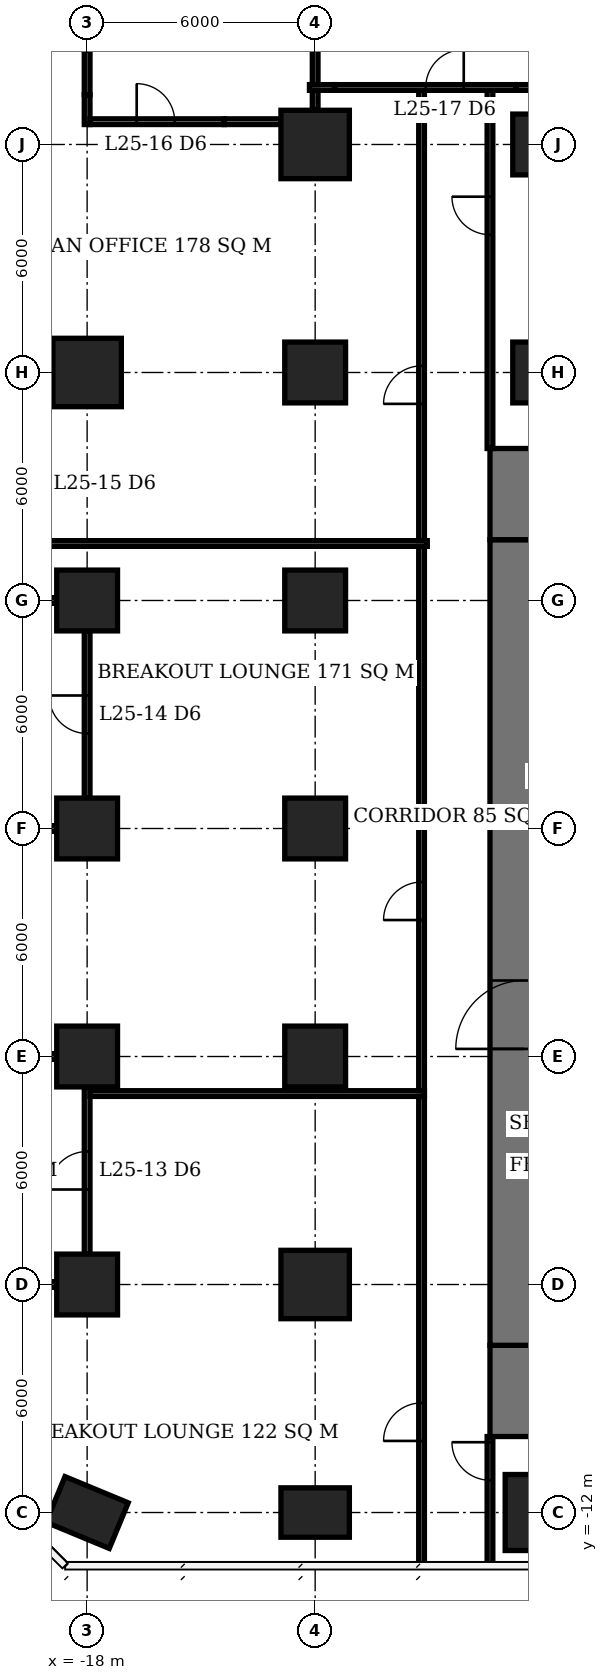
"""IFC4 building model, lengths in metres.
Left out: names, types, materials, properties, quantities, classifications, styles, units other than length and angle.
Written with IfcOpenShell. Run it as: python <this file> out.ifc"""

import sys

from ifc_helpers import new_model, si_unit, direction, frame, frame_2d, origin, origin_2d, place, context, subcontext, project, spatial, rectangle, extrude, element, fill, save


model = new_model("IFC4")
c1 = context("Model", 3, precision=1e-05, world=origin(), true_north=direction((0.0, 1.0)))
c2 = subcontext(c1, "Body", "Model", "MODEL_VIEW")
j1 = project(units=[si_unit("LENGTHUNIT", "METRE"), si_unit("PLANEANGLEUNIT", "RADIAN")], contexts=[c1])
p1 = place(None, origin())
s1 = spatial("IfcSite", under=j1, at=p1, CompositionType="ELEMENT")
p2 = place(p1, origin())
s2 = spatial("IfcBuilding", under=s1, at=p2, CompositionType="ELEMENT")
p3 = place(p2, frame((0.0, 0.0, 105.5)))
s3 = spatial("IfcBuildingStorey", under=s2, at=p3, CompositionType="ELEMENT", Elevation=105.5)
p4 = place(p3, frame((-18.0, -12.0, 0.0), z_axis=(0.0, 0.0, 1.0), x_axis=(-0.923879532511, 0.382683432365, 0.0)))
e1 = element("IfcColumn", 1, at=p4, inside=s3, PredefinedType="COLUMN", context=c2, shape_type="SweptSolid", body=[
    extrude(rectangle(XDim=1.8, YDim=1.3, at=origin_2d()), origin(), (0.0, 0.0, 1.0), 3.9),
])
for number, where, z_axis, x_axis in (
    (2, (-18.0, -6.0, 0.0), (0.0, 0.0, 1.0), (1.0, 0.0, 0.0)),
    (3, (-18.0, 0.0, 0.0), (0.0, 0.0, 1.0), (1.0, 0.0, 0.0)),
    (4, (-18.0, 6.0, 0.0), (0.0, 0.0, 1.0), (1.0, 0.0, 0.0)),
    (5, (-18.0, 12.0, 0.0), (0.0, 0.0, 1.0), (1.0, 0.0, 0.0)),
):
    element("IfcColumn", number, at=place(p3, frame(where, z_axis=z_axis, x_axis=x_axis)), inside=s3, PredefinedType="COLUMN", context=c2, shape_type="SweptSolid", body=[
        extrude(rectangle(XDim=1.6, YDim=1.6, at=origin_2d()), origin(), (0.0, 0.0, 1.0), 3.9),
    ])
p5 = place(p3, frame((-18.0, 18.0, 0.0), z_axis=(0.0, 0.0, 1.0), x_axis=(1.0, 0.0, 0.0)))
e6 = element("IfcColumn", 6, at=p5, inside=s3, PredefinedType="COLUMN", context=c2, shape_type="SweptSolid", body=[
    extrude(rectangle(XDim=1.8, YDim=1.8, at=origin_2d()), origin(), (0.0, 0.0, 1.0), 3.9),
])
p6 = place(p3, frame((-12.0, -12.0, 0.0), z_axis=(0.0, 0.0, 1.0), x_axis=(1.0, 0.0, 0.0)))
e7 = element("IfcColumn", 7, at=p6, inside=s3, PredefinedType="COLUMN", context=c2, shape_type="SweptSolid", body=[
    extrude(rectangle(XDim=1.8, YDim=1.3, at=origin_2d()), origin(), (0.0, 0.0, 1.0), 3.9),
])
p7 = place(p3, frame((-12.0, -6.0, 0.0), z_axis=(0.0, 0.0, 1.0), x_axis=(1.0, 0.0, 0.0)))
e8 = element("IfcColumn", 8, at=p7, inside=s3, PredefinedType="COLUMN", context=c2, shape_type="SweptSolid", body=[
    extrude(rectangle(XDim=1.8, YDim=1.8, at=origin_2d()), origin(), (0.0, 0.0, 1.0), 3.9),
])
for number, where, z_axis, x_axis in (
    (9, (-12.0, 0.0, 0.0), (0.0, 0.0, 1.0), (1.0, 0.0, 0.0)),
    (10, (-12.0, 6.0, 0.0), (0.0, 0.0, 1.0), (1.0, 0.0, 0.0)),
    (11, (-12.0, 12.0, 0.0), (0.0, 0.0, 1.0), (1.0, 0.0, 0.0)),
    (12, (-12.0, 18.0, 0.0), (0.0, 0.0, 1.0), (1.0, 0.0, 0.0)),
):
    element("IfcColumn", number, at=place(p3, frame(where, z_axis=z_axis, x_axis=x_axis)), inside=s3, PredefinedType="COLUMN", context=c2, shape_type="SweptSolid", body=[
        extrude(rectangle(XDim=1.6, YDim=1.6, at=origin_2d()), origin(), (0.0, 0.0, 1.0), 3.9),
    ])
p8 = place(p3, frame((-12.0, 24.0, 0.0), z_axis=(0.0, 0.0, 1.0), x_axis=(1.0, 0.0, 0.0)))
e13 = element("IfcColumn", 13, at=p8, inside=s3, PredefinedType="COLUMN", context=c2, shape_type="SweptSolid", body=[
    extrude(rectangle(XDim=1.8, YDim=1.8, at=origin_2d()), origin(), (0.0, 0.0, 1.0), 3.9),
])
p9 = place(p3, frame((-6.0, -12.0, 0.0), z_axis=(0.0, 0.0, 1.0), x_axis=(1.0, 0.0, 0.0)))
e14 = element("IfcColumn", 14, at=p9, inside=s3, PredefinedType="COLUMN", context=c2, shape_type="SweptSolid", body=[
    extrude(rectangle(XDim=2.0, YDim=2.0, at=origin_2d()), origin(), (0.0, 0.0, 1.0), 3.9),
])
for number, where, z_axis, x_axis in (
    (15, (-6.0, 18.0, 0.0), (0.0, 0.0, 1.0), (1.0, 0.0, 0.0)),
    (16, (-6.0, 24.0, 0.0), (0.0, 0.0, 1.0), (1.0, 0.0, 0.0)),
):
    element("IfcColumn", number, at=place(p3, frame(where, z_axis=z_axis, x_axis=x_axis)), inside=s3, PredefinedType="COLUMN", context=c2, shape_type="SweptSolid", body=[
        extrude(rectangle(XDim=1.6, YDim=1.6, at=origin_2d()), origin(), (0.0, 0.0, 1.0), 3.9),
    ])
p10 = place(p3, frame((-6.5, -7.6, 0.0), z_axis=(0.0, 0.0, 1.0), x_axis=(0.0, 1.0, 0.0)))
e17 = element("IfcWall", 17, at=p10, inside=s3, PredefinedType="SHEAR", context=c2, shape_type="SweptSolid", body=[
    extrude(rectangle(XDim=21.2, YDim=1.8, at=frame_2d((10.6, 0.0))), origin(), (0.0, 0.0, 1.0), 3.9),
])
p11 = place(p10, frame((7.8, 0.0, 0.0)))
e18 = element("IfcOpeningElement", 18, at=p11, cuts=e17, PredefinedType="OPENING", context=c2, shape_type="SweptSolid", body=[
    extrude(rectangle(XDim=1.8, YDim=2.4, at=frame_2d((0.9, 1.2))), frame((0.0, 0.91, 0.0), z_axis=(0.0, -1.0, 0.0), x_axis=(1.0, 0.0, 0.0)), (0.0, 0.0, 1.0), 1.82),
])
for number, where, z_axis, x_axis in (
    (19, (-6.5, -10.0, 0.0), (0.0, 0.0, 1.0), (0.0, 1.0, 0.0)),
    (20, (-6.5, 13.6, 0.0), (0.0, 0.0, 1.0), (0.0, 1.0, 0.0)),
):
    element("IfcWall", number, at=place(p3, frame(where, z_axis=z_axis, x_axis=x_axis)), inside=s3, PredefinedType="SHEAR", context=c2, shape_type="SweptSolid", body=[
        extrude(rectangle(XDim=2.4, YDim=1.8, at=frame_2d((1.2, 0.0))), origin(), (0.0, 0.0, 1.0), 3.9),
    ])
for number, where, z_axis, x_axis in (
    (21, (-22.31, -6.0, 0.0), (0.0, 0.0, 1.0), (1.0, 0.0, 0.0)),
    (22, (-22.31, 0.0, 0.0), (0.0, 0.0, 1.0), (1.0, 0.0, 0.0)),
    (23, (-22.31, 6.0, 0.0), (0.0, 0.0, 1.0), (1.0, 0.0, 0.0)),
):
    element("IfcWall", number, at=place(p3, frame(where, z_axis=z_axis, x_axis=x_axis)), inside=s3, PredefinedType="PARTITIONING", context=c2, shape_type="SweptSolid", body=[
        extrude(rectangle(XDim=3.51, YDim=0.15, at=frame_2d((1.755, 0.0))), origin(), (0.0, 0.0, 1.0), 2.65),
    ])
p12 = place(p3, frame((-19.2, 12.0, 0.0), z_axis=(0.0, 0.0, 1.0), x_axis=(1.0, 0.0, 0.0)))
e24 = element("IfcWall", 24, at=p12, inside=s3, PredefinedType="PARTITIONING", context=c2, shape_type="SweptSolid", body=[
    extrude(rectangle(XDim=0.4, YDim=0.15, at=frame_2d((0.2, 0.0))), origin(), (0.0, 0.0, 1.0), 2.65),
])
p13 = place(p3, frame((-17.925, 24.6, 0.0), z_axis=(0.0, 0.0, 1.0), x_axis=(1.0, 0.0, 0.0)))
e25 = element("IfcWall", 25, at=p13, inside=s3, PredefinedType="PARTITIONING", context=c2, shape_type="SweptSolid", body=[
    extrude(rectangle(XDim=3.533, YDim=0.15, at=frame_2d((1.767, 0.0))), origin(), (0.0, 0.0, 1.0), 3.65),
])
p14 = place(p13, frame((1.229, 0.0, 0.0)))
e26 = element("IfcOpeningElement", 26, at=p14, cuts=e25, PredefinedType="OPENING", context=c2, shape_type="SweptSolid", body=[
    extrude(rectangle(XDim=1.0, YDim=2.1, at=frame_2d((0.5, 1.05))), frame((0.0, 0.085, 0.0), z_axis=(0.0, -1.0, 0.0), x_axis=(1.0, 0.0, 0.0)), (0.0, 0.0, 1.0), 0.17),
])
p15 = place(p3, frame((-14.392, 24.6, 0.0), z_axis=(0.0, 0.0, 1.0), x_axis=(1.0, 0.0, 0.0)))
e27 = element("IfcWall", 27, at=p15, inside=s3, PredefinedType="PARTITIONING", context=c2, shape_type="SweptSolid", body=[
    extrude(rectangle(XDim=1.492, YDim=0.15, at=frame_2d((0.746, 0.0))), origin(), (0.0, 0.0, 1.0), 2.65),
])
p16 = place(p3, frame((-12.15, 25.5, 0.0), z_axis=(0.0, 0.0, 1.0), x_axis=(1.0, 0.0, 0.0)))
e28 = element("IfcWall", 28, at=p16, inside=s3, PredefinedType="PARTITIONING", context=c2, shape_type="SweptSolid", body=[
    extrude(rectangle(XDim=0.66, YDim=0.15, at=frame_2d((0.33, 0.0))), origin(), (0.0, 0.0, 1.0), 2.65),
])
p17 = place(p3, frame((-11.49, 25.5, 0.0), z_axis=(0.0, 0.0, 1.0), x_axis=(1.0, 0.0, 0.0)))
e29 = element("IfcWall", 29, at=p17, inside=s3, PredefinedType="PARTITIONING", context=c2, shape_type="SweptSolid", body=[
    extrude(rectangle(XDim=4.78, YDim=0.15, at=frame_2d((2.39, 0.0))), origin(), (0.0, 0.0, 1.0), 3.65),
])
p18 = place(p17, frame((2.4, 0.0, 0.0)))
e30 = element("IfcOpeningElement", 30, at=p18, cuts=e29, PredefinedType="OPENING", context=c2, shape_type="SweptSolid", body=[
    extrude(rectangle(XDim=1.0, YDim=2.1, at=frame_2d((0.5, 1.05))), frame((0.0, 0.085, 0.0), z_axis=(0.0, -1.0, 0.0), x_axis=(1.0, 0.0, 0.0)), (0.0, 0.0, 1.0), 0.17),
])
p19 = place(p3, frame((-6.71, 25.5, 0.0), z_axis=(0.0, 0.0, 1.0), x_axis=(1.0, 0.0, 0.0)))
e31 = element("IfcWall", 31, at=p19, inside=s3, PredefinedType="PARTITIONING", context=c2, shape_type="SweptSolid", body=[
    extrude(rectangle(XDim=0.785, YDim=0.15, at=frame_2d((0.393, 0.0))), origin(), (0.0, 0.0, 1.0), 2.65),
])
p20 = place(p3, frame((-18.0, -5.2, 0.0), z_axis=(0.0, 0.0, 1.0), x_axis=(0.0, 1.0, 0.0)))
e32 = element("IfcWall", 32, at=p20, inside=s3, PredefinedType="PARTITIONING", context=c2, shape_type="SweptSolid", body=[
    extrude(rectangle(XDim=4.4, YDim=0.15, at=frame_2d((2.2, 0.0))), origin(), (0.0, 0.0, 1.0), 3.65),
])
p21 = place(p20, frame((1.7, 0.0, 0.0)))
e33 = element("IfcOpeningElement", 33, at=p21, cuts=e32, PredefinedType="OPENING", context=c2, shape_type="SweptSolid", body=[
    extrude(rectangle(XDim=1.0, YDim=2.1, at=frame_2d((0.5, 1.05))), frame((0.0, 0.085, 0.0), z_axis=(0.0, -1.0, 0.0), x_axis=(1.0, 0.0, 0.0)), (0.0, 0.0, 1.0), 0.17),
])
p22 = place(p3, frame((-18.0, 6.8, 0.0), z_axis=(0.0, 0.0, 1.0), x_axis=(0.0, 1.0, 0.0)))
e34 = element("IfcWall", 34, at=p22, inside=s3, PredefinedType="PARTITIONING", context=c2, shape_type="SweptSolid", body=[
    extrude(rectangle(XDim=4.4, YDim=0.15, at=frame_2d((2.2, 0.0))), origin(), (0.0, 0.0, 1.0), 3.65),
])
p23 = place(p22, frame((1.7, 0.0, 0.0)))
e35 = element("IfcOpeningElement", 35, at=p23, cuts=e34, PredefinedType="OPENING", context=c2, shape_type="SweptSolid", body=[
    extrude(rectangle(XDim=1.0, YDim=2.1, at=frame_2d((0.5, 1.05))), frame((0.0, 0.085, 0.0), z_axis=(0.0, -1.0, 0.0), x_axis=(1.0, 0.0, 0.0)), (0.0, 0.0, 1.0), 0.17),
])
p24 = place(p3, frame((-18.0, 24.525, 0.0), z_axis=(0.0, 0.0, 1.0), x_axis=(0.0, 1.0, 0.0)))
e36 = element("IfcWall", 36, at=p24, inside=s3, PredefinedType="PARTITIONING", context=c2, shape_type="SweptSolid", body=[
    extrude(rectangle(XDim=0.785, YDim=0.15, at=frame_2d((0.393, 0.0))), origin(), (0.0, 0.0, 1.0), 3.65),
])
p25 = place(p3, frame((-18.0, 25.31, 0.0), z_axis=(0.0, 0.0, 1.0), x_axis=(0.0, 1.0, 0.0)))
e37 = element("IfcWall", 37, at=p25, inside=s3, PredefinedType="PARTITIONING", context=c2, shape_type="SweptSolid", body=[
    extrude(rectangle(XDim=1.18, YDim=0.15, at=frame_2d((0.59, 0.0))), origin(), (0.0, 0.0, 1.0), 2.65),
])
p26 = place(p3, frame((-12.0, 24.9, 0.0), z_axis=(0.0, 0.0, 1.0), x_axis=(0.0, 1.0, 0.0)))
e38 = element("IfcWall", 38, at=p26, inside=s3, PredefinedType="PARTITIONING", context=c2, shape_type="SweptSolid", body=[
    extrude(rectangle(XDim=0.525, YDim=0.15, at=frame_2d((0.263, 0.0))), origin(), (0.0, 0.0, 1.0), 2.65),
])
p27 = place(p3, frame((-12.0, 25.575, 0.0), z_axis=(0.0, 0.0, 1.0), x_axis=(0.0, 1.0, 0.0)))
e39 = element("IfcWall", 39, at=p27, inside=s3, PredefinedType="PARTITIONING", context=c2, shape_type="SweptSolid", body=[
    extrude(rectangle(XDim=2.735, YDim=0.15, at=frame_2d((1.368, 0.0))), origin(), (0.0, 0.0, 1.0), 2.65),
])
p28 = place(p3, frame((-19.125, 13.5, 0.0), z_axis=(0.0, 0.0, 1.0), x_axis=(1.0, 0.0, 0.0)))
e40 = element("IfcWall", 40, at=p28, inside=s3, PredefinedType="PARTITIONING", context=c2, shape_type="SweptSolid", body=[
    extrude(rectangle(XDim=10.075, YDim=0.15, at=frame_2d((5.038, 0.0))), origin(), (0.0, 0.0, 1.0), 3.65),
])
p29 = place(p3, frame((-17.925, -0.975, 0.0), z_axis=(0.0, 0.0, 1.0), x_axis=(1.0, 0.0, 0.0)))
e41 = element("IfcWall", 41, at=p29, inside=s3, PredefinedType="PARTITIONING", context=c2, shape_type="SweptSolid", body=[
    extrude(rectangle(XDim=8.8, YDim=0.15, at=frame_2d((4.4, 0.0))), origin(), (0.0, 0.0, 1.0), 3.65),
])
p30 = place(p3, frame((-9.2, -13.35, 0.0), z_axis=(0.0, 0.0, 1.0), x_axis=(0.0, 1.0, 0.0)))
e42 = element("IfcWall", 42, at=p30, inside=s3, PredefinedType="PARTITIONING", context=c2, shape_type="SweptSolid", body=[
    extrude(rectangle(XDim=12.3, YDim=0.15, at=frame_2d((6.15, 0.0))), origin(), (0.0, 0.0, 1.0), 3.65),
])
p31 = place(p30, frame((3.234, 0.0, 0.0)))
e43 = element("IfcOpeningElement", 43, at=p31, cuts=e42, PredefinedType="OPENING", context=c2, shape_type="SweptSolid", body=[
    extrude(rectangle(XDim=1.0, YDim=2.1, at=frame_2d((0.5, 1.05))), frame((0.0, 0.085, 0.0), z_axis=(0.0, -1.0, 0.0), x_axis=(1.0, 0.0, 0.0)), (0.0, 0.0, 1.0), 0.17),
])
p32 = place(p3, frame((-9.2, -0.9, 0.0), z_axis=(0.0, 0.0, 1.0), x_axis=(0.0, 1.0, 0.0)))
e44 = element("IfcWall", 44, at=p32, inside=s3, PredefinedType="PARTITIONING", context=c2, shape_type="SweptSolid", body=[
    extrude(rectangle(XDim=14.325, YDim=0.15, at=frame_2d((7.163, 0.0))), origin(), (0.0, 0.0, 1.0), 3.65),
])
p33 = place(p32, frame((4.491, 0.0, 0.0)))
e45 = element("IfcOpeningElement", 45, at=p33, cuts=e44, PredefinedType="OPENING", context=c2, shape_type="SweptSolid", body=[
    extrude(rectangle(XDim=1.0, YDim=2.1, at=frame_2d((0.5, 1.05))), frame((0.0, 0.085, 0.0), z_axis=(0.0, -1.0, 0.0), x_axis=(1.0, 0.0, 0.0)), (0.0, 0.0, 1.0), 0.17),
])
p34 = place(p3, frame((-9.2, 13.575, 0.0), z_axis=(0.0, 0.0, 1.0), x_axis=(0.0, 1.0, 0.0)))
e46 = element("IfcWall", 46, at=p34, inside=s3, PredefinedType="PARTITIONING", context=c2, shape_type="SweptSolid", body=[
    extrude(rectangle(XDim=11.85, YDim=0.15, at=frame_2d((5.925, 0.0))), origin(), (0.0, 0.0, 1.0), 3.65),
])
p35 = place(p34, frame((3.599, 0.0, 0.0)))
e47 = element("IfcOpeningElement", 47, at=p35, cuts=e46, PredefinedType="OPENING", context=c2, shape_type="SweptSolid", body=[
    extrude(rectangle(XDim=1.0, YDim=2.1, at=frame_2d((0.5, 1.05))), frame((0.0, 0.085, 0.0), z_axis=(0.0, -1.0, 0.0), x_axis=(1.0, 0.0, 0.0)), (0.0, 0.0, 1.0), 0.17),
])
p36 = place(p3, frame((-7.4, -13.4, 0.0), z_axis=(0.0, 0.0, 1.0), x_axis=(0.0, 1.0, 0.0)))
e48 = element("IfcWall", 48, at=p36, inside=s3, PredefinedType="PARTITIONING", context=c2, shape_type="SweptSolid", body=[
    extrude(rectangle(XDim=3.4, YDim=0.15, at=frame_2d((1.7, 0.0))), origin(), (0.0, 0.0, 1.0), 3.65),
])
p37 = place(p36, frame((2.25, 0.0, 0.0)))
e49 = element("IfcOpeningElement", 49, at=p37, cuts=e48, PredefinedType="OPENING", context=c2, shape_type="SweptSolid", body=[
    extrude(rectangle(XDim=1.0, YDim=2.1, at=frame_2d((0.5, 1.05))), frame((0.0, 0.085, 0.0), z_axis=(0.0, -1.0, 0.0), x_axis=(1.0, 0.0, 0.0)), (0.0, 0.0, 1.0), 0.17),
])
p38 = place(p3, frame((-7.4, 16.0, 0.0), z_axis=(0.0, 0.0, 1.0), x_axis=(0.0, 1.0, 0.0)))
e50 = element("IfcWall", 50, at=p38, inside=s3, PredefinedType="PARTITIONING", context=c2, shape_type="SweptSolid", body=[
    extrude(rectangle(XDim=9.425, YDim=0.15, at=frame_2d((4.712, 0.0))), origin(), (0.0, 0.0, 1.0), 3.65),
])
p39 = place(p38, frame((5.626, 0.0, 0.0)))
e51 = element("IfcOpeningElement", 51, at=p39, cuts=e50, PredefinedType="OPENING", context=c2, shape_type="SweptSolid", body=[
    extrude(rectangle(XDim=1.0, YDim=2.1, at=frame_2d((0.5, 1.05))), frame((0.0, 0.085, 0.0), z_axis=(0.0, -1.0, 0.0), x_axis=(1.0, 0.0, 0.0)), (0.0, 0.0, 1.0), 0.17),
])
p40 = place(p11, origin())
e52 = element("IfcDoor", 52, at=p40, inside=s3, OperationType="DOUBLE_DOOR_SINGLE_SWING", PredefinedType="DOOR", context=c2, shape_type="SweptSolid", body=[
    extrude(rectangle(XDim=1.8, YDim=2.4, at=frame_2d((0.9, 1.2))), frame((0.0, 0.025, 0.0), z_axis=(0.0, -1.0, 0.0), x_axis=(1.0, 0.0, 0.0)), (0.0, 0.0, 1.0), 0.05),
])
fill(e18, e52)
p41 = place(p21, origin())
e53 = element("IfcDoor", 53, at=p41, inside=s3, OperationType="SINGLE_SWING_LEFT", PredefinedType="DOOR", context=c2, shape_type="SweptSolid", body=[
    extrude(rectangle(XDim=1.0, YDim=2.1, at=frame_2d((0.5, 1.05))), frame((0.0, 0.025, 0.0), z_axis=(0.0, -1.0, 0.0), x_axis=(1.0, 0.0, 0.0)), (0.0, 0.0, 1.0), 0.05),
])
fill(e33, e53)
p42 = place(p23, origin())
e54 = element("IfcDoor", 54, at=p42, inside=s3, OperationType="SINGLE_SWING_RIGHT", PredefinedType="DOOR", context=c2, shape_type="SweptSolid", body=[
    extrude(rectangle(XDim=1.0, YDim=2.1, at=frame_2d((0.5, 1.05))), frame((0.0, 0.025, 0.0), z_axis=(0.0, -1.0, 0.0), x_axis=(1.0, 0.0, 0.0)), (0.0, 0.0, 1.0), 0.05),
])
fill(e35, e54)
p43 = place(p14, origin())
e55 = element("IfcDoor", 55, at=p43, inside=s3, OperationType="SINGLE_SWING_LEFT", PredefinedType="DOOR", context=c2, shape_type="SweptSolid", body=[
    extrude(rectangle(XDim=1.0, YDim=2.1, at=frame_2d((0.5, 1.05))), frame((0.0, 0.025, 0.0), z_axis=(0.0, -1.0, 0.0), x_axis=(1.0, 0.0, 0.0)), (0.0, 0.0, 1.0), 0.05),
])
fill(e26, e55)
p44 = place(p18, origin())
e56 = element("IfcDoor", 56, at=p44, inside=s3, OperationType="SINGLE_SWING_RIGHT", PredefinedType="DOOR", context=c2, shape_type="SweptSolid", body=[
    extrude(rectangle(XDim=1.0, YDim=2.1, at=frame_2d((0.5, 1.05))), frame((0.0, 0.025, 0.0), z_axis=(0.0, -1.0, 0.0), x_axis=(1.0, 0.0, 0.0)), (0.0, 0.0, 1.0), 0.05),
])
fill(e30, e56)
p45 = place(p31, origin())
e57 = element("IfcDoor", 57, at=p45, inside=s3, OperationType="SINGLE_SWING_LEFT", PredefinedType="DOOR", context=c2, shape_type="SweptSolid", body=[
    extrude(rectangle(XDim=1.0, YDim=2.1, at=frame_2d((0.5, 1.05))), frame((0.0, 0.025, 0.0), z_axis=(0.0, -1.0, 0.0), x_axis=(1.0, 0.0, 0.0)), (0.0, 0.0, 1.0), 0.05),
])
fill(e43, e57)
p46 = place(p33, origin())
e58 = element("IfcDoor", 58, at=p46, inside=s3, OperationType="SINGLE_SWING_LEFT", PredefinedType="DOOR", context=c2, shape_type="SweptSolid", body=[
    extrude(rectangle(XDim=1.0, YDim=2.1, at=frame_2d((0.5, 1.05))), frame((0.0, 0.025, 0.0), z_axis=(0.0, -1.0, 0.0), x_axis=(1.0, 0.0, 0.0)), (0.0, 0.0, 1.0), 0.05),
])
fill(e45, e58)
p47 = place(p39, origin())
e59 = element("IfcDoor", 59, at=p47, inside=s3, OperationType="SINGLE_SWING_RIGHT", PredefinedType="DOOR", context=c2, shape_type="SweptSolid", body=[
    extrude(rectangle(XDim=1.0, YDim=2.1, at=frame_2d((0.5, 1.05))), frame((0.0, 0.025, 0.0), z_axis=(0.0, -1.0, 0.0), x_axis=(1.0, 0.0, 0.0)), (0.0, 0.0, 1.0), 0.05),
])
fill(e51, e59)
p48 = place(p35, origin())
e60 = element("IfcDoor", 60, at=p48, inside=s3, OperationType="SINGLE_SWING_LEFT", PredefinedType="DOOR", context=c2, shape_type="SweptSolid", body=[
    extrude(rectangle(XDim=1.0, YDim=2.1, at=frame_2d((0.5, 1.05))), frame((0.0, 0.025, 0.0), z_axis=(0.0, -1.0, 0.0), x_axis=(1.0, 0.0, 0.0)), (0.0, 0.0, 1.0), 0.05),
])
fill(e47, e60)
p49 = place(p37, origin())
e61 = element("IfcDoor", 61, at=p49, inside=s3, OperationType="SINGLE_SWING_RIGHT", PredefinedType="DOOR", context=c2, shape_type="SweptSolid", body=[
    extrude(rectangle(XDim=1.0, YDim=2.1, at=frame_2d((0.5, 1.05))), frame((0.0, 0.025, 0.0), z_axis=(0.0, -1.0, 0.0), x_axis=(1.0, 0.0, 0.0)), (0.0, 0.0, 1.0), 0.05),
])
fill(e49, e61)
save(model, sys.argv[1])
